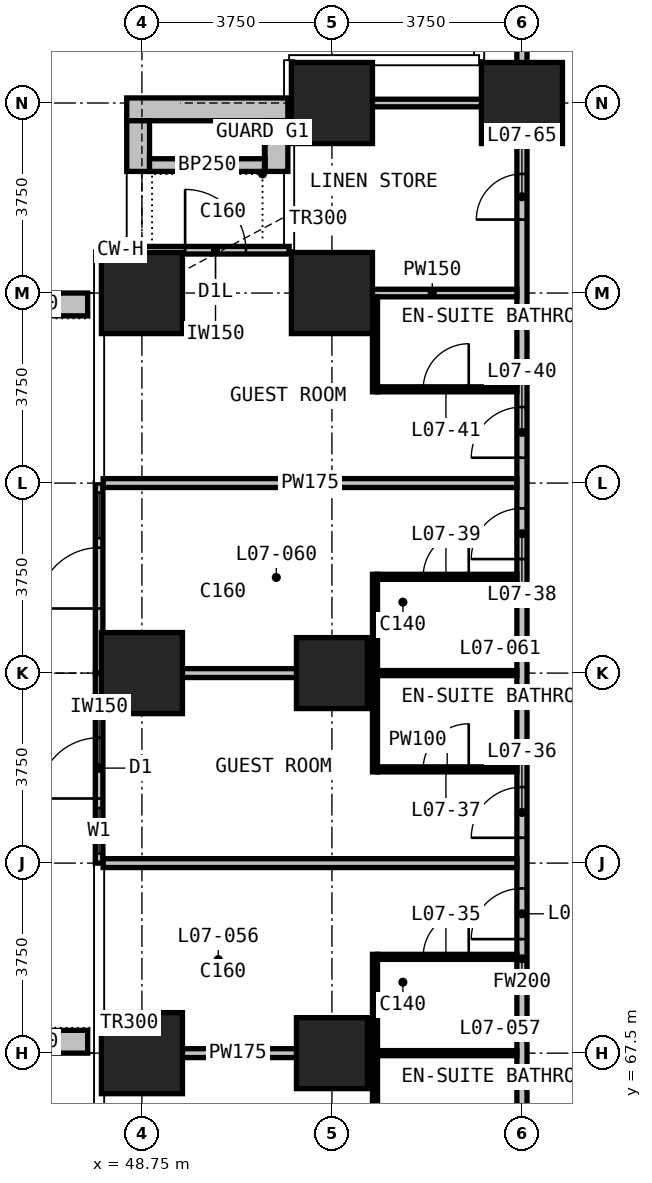
"""IFC4 building model, lengths in metres.
Left out: names, types, materials, properties, quantities, classifications, styles, units other than length and angle.
Written with IfcOpenShell. Run it as: python <this file> out.ifc"""

import sys

from ifc_helpers import new_model, si_unit, direction, frame, frame_2d, origin, origin_2d, place, context, subcontext, project, spatial, rectangle, extrude, element, fill, save


model = new_model("IFC4")
c1 = context("Model", 3, precision=1e-05, world=origin(), true_north=direction((0.0, 1.0)))
c2 = subcontext(c1, "Body", "Model", "MODEL_VIEW")
j1 = project(units=[si_unit("LENGTHUNIT", "METRE"), si_unit("PLANEANGLEUNIT", "RADIAN")], contexts=[c1])
p1 = place(None, origin())
s1 = spatial("IfcSite", under=j1, at=p1, CompositionType="ELEMENT")
p2 = place(p1, origin())
s2 = spatial("IfcBuilding", under=s1, at=p2, CompositionType="ELEMENT")
p3 = place(p2, frame((0.0, 0.0, 42.8)))
s3 = spatial("IfcBuildingStorey", under=s2, at=p3, CompositionType="ELEMENT", Elevation=42.8)
for number, where, z_axis, x_axis in (
    (1, (48.75, 67.5, 0.0), (0.0, 0.0, 1.0), (1.0, 0.0, 0.0)),
    (2, (48.75, 75.0, 0.0), (0.0, 0.0, 1.0), (1.0, 0.0, 0.0)),
    (3, (48.75, 82.5, 0.0), (0.0, 0.0, 1.0), (1.0, 0.0, 0.0)),
):
    element("IfcColumn", number, at=place(p3, frame(where, z_axis=z_axis, x_axis=x_axis)), inside=s3, PredefinedType="COLUMN", context=c2, shape_type="SweptSolid", body=[
        extrude(rectangle(XDim=1.6, YDim=1.6, at=origin_2d()), origin(), (0.0, 0.0, 1.0), 3.3),
    ])
for number, where, z_axis, x_axis in (
    (4, (52.5, 67.5, 0.0), (0.0, 0.0, 1.0), (1.0, 0.0, 0.0)),
    (5, (52.5, 75.0, 0.0), (0.0, 0.0, 1.0), (1.0, 0.0, 0.0)),
):
    element("IfcColumn", number, at=place(p3, frame(where, z_axis=z_axis, x_axis=x_axis)), inside=s3, PredefinedType="COLUMN", context=c2, shape_type="SweptSolid", body=[
        extrude(rectangle(XDim=1.4, YDim=1.4, at=origin_2d()), origin(), (0.0, 0.0, 1.0), 3.3),
    ])
for number, where, z_axis, x_axis in (
    (6, (52.5, 82.5, 0.0), (0.0, 0.0, 1.0), (1.0, 0.0, 0.0)),
    (7, (52.5, 86.25, 0.0), (0.0, 0.0, 1.0), (1.0, 0.0, 0.0)),
    (8, (56.25, 86.25, 0.0), (0.0, 0.0, 1.0), (1.0, 0.0, 0.0)),
):
    element("IfcColumn", number, at=place(p3, frame(where, z_axis=z_axis, x_axis=x_axis)), inside=s3, PredefinedType="COLUMN", context=c2, shape_type="SweptSolid", body=[
        extrude(rectangle(XDim=1.6, YDim=1.6, at=origin_2d()), origin(), (0.0, 0.0, 1.0), 3.3),
    ])
p4 = place(p3, frame((48.75, 83.345, 0.0), z_axis=(0.0, 0.0, 1.0), x_axis=(1.0, 0.0, 0.0)))
e9 = element("IfcWall", 9, at=p4, inside=s3, PredefinedType="SOLIDWALL", context=c2, shape_type="SweptSolid", body=[
    extrude(rectangle(XDim=2.905, YDim=0.15, at=frame_2d((1.453, 0.0))), origin(), (0.0, 0.0, 1.0), 3.0),
])
p5 = place(p4, frame((0.853, 0.0, 0.0)))
e10 = element("IfcOpeningElement", 10, at=p5, cuts=e9, PredefinedType="OPENING", context=c2, shape_type="SweptSolid", body=[
    extrude(rectangle(XDim=1.2, YDim=2.0, at=frame_2d((0.6, 1.0))), frame((0.0, 0.085, 0.0), z_axis=(0.0, -1.0, 0.0), x_axis=(1.0, 0.0, 0.0)), (0.0, 0.0, 1.0), 0.17),
])
p6 = place(p3, frame((47.905, 71.25, 0.0), z_axis=(0.0, 0.0, 1.0), x_axis=(0.0, 1.0, 0.0)))
e11 = element("IfcWall", 11, at=p6, inside=s3, PredefinedType="SOLIDWALL", context=c2, shape_type="SweptSolid", body=[
    extrude(rectangle(XDim=3.75, YDim=0.15, at=frame_2d((1.875, 0.0))), origin(), (0.0, 0.0, 1.0), 3.0),
])
p7 = place(p6, frame((0.188, 0.0, 0.1)))
e12 = element("IfcOpeningElement", 12, at=p7, cuts=e11, PredefinedType="OPENING", context=c2, shape_type="SweptSolid", body=[
    extrude(rectangle(XDim=0.9, YDim=2.4, at=frame_2d((0.45, 1.2))), frame((0.0, 0.085, 0.0), z_axis=(0.0, -1.0, 0.0), x_axis=(1.0, 0.0, 0.0)), (0.0, 0.0, 1.0), 0.17),
])
p8 = place(p6, frame((1.275, 0.0, 0.0)))
e13 = element("IfcOpeningElement", 13, at=p8, cuts=e11, PredefinedType="OPENING", context=c2, shape_type="SweptSolid", body=[
    extrude(rectangle(XDim=1.2, YDim=2.4, at=frame_2d((0.6, 1.2))), frame((0.0, 0.085, 0.0), z_axis=(0.0, -1.0, 0.0), x_axis=(1.0, 0.0, 0.0)), (0.0, 0.0, 1.0), 0.17),
])
p9 = place(p3, frame((47.905, 75.0, 0.0), z_axis=(0.0, 0.0, 1.0), x_axis=(0.0, 1.0, 0.0)))
e14 = element("IfcWall", 14, at=p9, inside=s3, PredefinedType="SOLIDWALL", context=c2, shape_type="SweptSolid", body=[
    extrude(rectangle(XDim=3.75, YDim=0.15, at=frame_2d((1.875, 0.0))), origin(), (0.0, 0.0, 1.0), 3.0),
])
p10 = place(p9, frame((1.275, 0.0, 0.0)))
e15 = element("IfcOpeningElement", 15, at=p10, cuts=e14, PredefinedType="OPENING", context=c2, shape_type="SweptSolid", body=[
    extrude(rectangle(XDim=1.2, YDim=2.4, at=frame_2d((0.6, 1.2))), frame((0.0, 0.085, 0.0), z_axis=(0.0, -1.0, 0.0), x_axis=(1.0, 0.0, 0.0)), (0.0, 0.0, 1.0), 0.17),
])
p11 = place(p9, frame((2.663, 0.0, 0.1)))
e16 = element("IfcOpeningElement", 16, at=p11, cuts=e14, PredefinedType="OPENING", context=c2, shape_type="SweptSolid", body=[
    extrude(rectangle(XDim=0.9, YDim=2.4, at=frame_2d((0.45, 1.2))), frame((0.0, 0.085, 0.0), z_axis=(0.0, -1.0, 0.0), x_axis=(1.0, 0.0, 0.0)), (0.0, 0.0, 1.0), 0.17),
])
p12 = place(p3, frame((48.45, 86.125, 0.0), z_axis=(0.0, 0.0, 1.0), x_axis=(1.0, 0.0, 0.0)))
e17 = element("IfcWall", 17, at=p12, inside=s3, PredefinedType="USERDEFINED", context=c2, shape_type="SweptSolid", body=[
    extrude(rectangle(XDim=3.18, YDim=0.45, at=frame_2d((1.59, 0.0))), origin(), (0.0, 0.0, 1.0), 1.1),
])
for number, where, z_axis, x_axis in (
    (18, (48.675, 84.9, 0.0), (0.0, 0.0, 1.0), (0.0, 1.0, 0.0)),
    (19, (51.405, 84.9, 0.0), (0.0, 0.0, 1.0), (0.0, 1.0, 0.0)),
):
    element("IfcWall", number, at=place(p3, frame(where, z_axis=z_axis, x_axis=x_axis)), inside=s3, PredefinedType="USERDEFINED", context=c2, shape_type="SweptSolid", body=[
        extrude(rectangle(XDim=1.0, YDim=0.45, at=frame_2d((0.5, 0.0))), origin(), (0.0, 0.0, 1.0), 1.1),
    ])
p13 = place(p3, frame((48.9, 85.025, 0.0), z_axis=(0.0, 0.0, 1.0), x_axis=(1.0, 0.0, 0.0)))
e20 = element("IfcWall", 20, at=p13, inside=s3, PredefinedType="USERDEFINED", context=c2, shape_type="SweptSolid", body=[
    extrude(rectangle(XDim=2.28, YDim=0.25, at=frame_2d((1.14, 0.0))), origin(), (0.0, 0.0, 1.0), 1.0),
])
for number, where, z_axis, x_axis in (
    (21, (47.68, 67.725, 0.0), (0.0, 0.0, 1.0), (-1.0, 0.0, 0.0)),
    (22, (47.68, 82.275, 0.0), (0.0, 0.0, 1.0), (-1.0, 0.0, 0.0)),
):
    element("IfcWall", number, at=place(p3, frame(where, z_axis=z_axis, x_axis=x_axis)), inside=s3, PredefinedType="USERDEFINED", context=c2, shape_type="SweptSolid", body=[
        extrude(rectangle(XDim=2.33, YDim=0.45, at=frame_2d((1.165, 0.0))), origin(), (0.0, 0.0, 1.0), 1.1),
    ])
p14 = place(p3, frame((56.25, 52.4, 0.0), z_axis=(0.0, 0.0, 1.0), x_axis=(0.0, 1.0, 0.0)))
e23 = element("IfcWall", 23, at=p14, inside=s3, PredefinedType="PARTITIONING", context=c2, shape_type="SweptSolid", body=[
    extrude(rectangle(XDim=33.925, YDim=0.2, at=frame_2d((16.962, 0.0))), origin(), (0.0, 0.0, 1.0), 3.0),
])
p15 = place(p14, frame((2.35, 0.0, 0.0)))
e24 = element("IfcOpeningElement", 24, at=p15, cuts=e23, PredefinedType="OPENING", context=c2, shape_type="SweptSolid", body=[
    extrude(rectangle(XDim=1.0, YDim=2.2, at=frame_2d((0.5, 1.1))), frame((0.0, 0.11, 0.0), z_axis=(0.0, -1.0, 0.0), x_axis=(1.0, 0.0, 0.0)), (0.0, 0.0, 1.0), 0.22),
])
p16 = place(p14, frame((4.35, 0.0, 0.0)))
e25 = element("IfcOpeningElement", 25, at=p16, cuts=e23, PredefinedType="OPENING", context=c2, shape_type="SweptSolid", body=[
    extrude(rectangle(XDim=1.0, YDim=2.2, at=frame_2d((0.5, 1.1))), frame((0.0, 0.11, 0.0), z_axis=(0.0, -1.0, 0.0), x_axis=(1.0, 0.0, 0.0)), (0.0, 0.0, 1.0), 0.22),
])
p17 = place(p14, frame((9.85, 0.0, 0.0)))
e26 = element("IfcOpeningElement", 26, at=p17, cuts=e23, PredefinedType="OPENING", context=c2, shape_type="SweptSolid", body=[
    extrude(rectangle(XDim=1.0, YDim=2.2, at=frame_2d((0.5, 1.1))), frame((0.0, 0.11, 0.0), z_axis=(0.0, -1.0, 0.0), x_axis=(1.0, 0.0, 0.0)), (0.0, 0.0, 1.0), 0.22),
])
p18 = place(p14, frame((11.85, 0.0, 0.0)))
e27 = element("IfcOpeningElement", 27, at=p18, cuts=e23, PredefinedType="OPENING", context=c2, shape_type="SweptSolid", body=[
    extrude(rectangle(XDim=1.0, YDim=2.2, at=frame_2d((0.5, 1.1))), frame((0.0, 0.11, 0.0), z_axis=(0.0, -1.0, 0.0), x_axis=(1.0, 0.0, 0.0)), (0.0, 0.0, 1.0), 0.22),
])
p19 = place(p14, frame((17.35, 0.0, 0.0)))
e28 = element("IfcOpeningElement", 28, at=p19, cuts=e23, PredefinedType="OPENING", context=c2, shape_type="SweptSolid", body=[
    extrude(rectangle(XDim=1.0, YDim=2.2, at=frame_2d((0.5, 1.1))), frame((0.0, 0.11, 0.0), z_axis=(0.0, -1.0, 0.0), x_axis=(1.0, 0.0, 0.0)), (0.0, 0.0, 1.0), 0.22),
])
p20 = place(p14, frame((19.35, 0.0, 0.0)))
e29 = element("IfcOpeningElement", 29, at=p20, cuts=e23, PredefinedType="OPENING", context=c2, shape_type="SweptSolid", body=[
    extrude(rectangle(XDim=1.0, YDim=2.2, at=frame_2d((0.5, 1.1))), frame((0.0, 0.11, 0.0), z_axis=(0.0, -1.0, 0.0), x_axis=(1.0, 0.0, 0.0)), (0.0, 0.0, 1.0), 0.22),
])
p21 = place(p14, frame((24.85, 0.0, 0.0)))
e30 = element("IfcOpeningElement", 30, at=p21, cuts=e23, PredefinedType="OPENING", context=c2, shape_type="SweptSolid", body=[
    extrude(rectangle(XDim=1.0, YDim=2.2, at=frame_2d((0.5, 1.1))), frame((0.0, 0.11, 0.0), z_axis=(0.0, -1.0, 0.0), x_axis=(1.0, 0.0, 0.0)), (0.0, 0.0, 1.0), 0.22),
])
p22 = place(p14, frame((26.85, 0.0, 0.0)))
e31 = element("IfcOpeningElement", 31, at=p22, cuts=e23, PredefinedType="OPENING", context=c2, shape_type="SweptSolid", body=[
    extrude(rectangle(XDim=1.0, YDim=2.2, at=frame_2d((0.5, 1.1))), frame((0.0, 0.11, 0.0), z_axis=(0.0, -1.0, 0.0), x_axis=(1.0, 0.0, 0.0)), (0.0, 0.0, 1.0), 0.22),
])
p23 = place(p14, frame((31.55, 0.0, 0.0)))
e32 = element("IfcOpeningElement", 32, at=p23, cuts=e23, PredefinedType="OPENING", context=c2, shape_type="SweptSolid", body=[
    extrude(rectangle(XDim=0.9, YDim=2.2, at=frame_2d((0.45, 1.1))), frame((0.0, 0.11, 0.0), z_axis=(0.0, -1.0, 0.0), x_axis=(1.0, 0.0, 0.0)), (0.0, 0.0, 1.0), 0.22),
])
p24 = place(p3, frame((56.25, 86.28, 0.0), z_axis=(0.0, 0.0, 1.0), x_axis=(0.0, 1.0, 0.0)))
e33 = element("IfcWall", 33, at=p24, inside=s3, PredefinedType="PARTITIONING", context=c2, shape_type="SweptSolid", body=[
    extrude(rectangle(XDim=4.365, YDim=0.2, at=frame_2d((2.183, 0.0))), origin(), (0.0, 0.0, 1.0), 3.0),
])
p25 = place(p3, frame((47.985, 67.5, 0.0), z_axis=(0.0, 0.0, 1.0), x_axis=(1.0, 0.0, 0.0)))
e34 = element("IfcWall", 34, at=p25, inside=s3, PredefinedType="PARTITIONING", context=c2, shape_type="SweptSolid", body=[
    extrude(rectangle(XDim=5.315, YDim=0.175, at=frame_2d((2.657, 0.0))), origin(), (0.0, 0.0, 1.0), 3.0),
])
p26 = place(p3, frame((47.985, 71.25, 0.0), z_axis=(0.0, 0.0, 1.0), x_axis=(1.0, 0.0, 0.0)))
e35 = element("IfcWall", 35, at=p26, inside=s3, PredefinedType="PARTITIONING", context=c2, shape_type="SweptSolid", body=[
    extrude(rectangle(XDim=8.165, YDim=0.175, at=frame_2d((4.083, 0.0))), origin(), (0.0, 0.0, 1.0), 3.0),
])
p27 = place(p3, frame((47.985, 75.0, 0.0), z_axis=(0.0, 0.0, 1.0), x_axis=(1.0, 0.0, 0.0)))
e36 = element("IfcWall", 36, at=p27, inside=s3, PredefinedType="PARTITIONING", context=c2, shape_type="SweptSolid", body=[
    extrude(rectangle(XDim=5.315, YDim=0.175, at=frame_2d((2.657, 0.0))), origin(), (0.0, 0.0, 1.0), 3.0),
])
p28 = place(p3, frame((47.985, 78.75, 0.0), z_axis=(0.0, 0.0, 1.0), x_axis=(1.0, 0.0, 0.0)))
e37 = element("IfcWall", 37, at=p28, inside=s3, PredefinedType="PARTITIONING", context=c2, shape_type="SweptSolid", body=[
    extrude(rectangle(XDim=8.165, YDim=0.175, at=frame_2d((4.083, 0.0))), origin(), (0.0, 0.0, 1.0), 3.0),
])
p29 = place(p3, frame((52.81, 82.5, 0.0), z_axis=(0.0, 0.0, 1.0), x_axis=(1.0, 0.0, 0.0)))
e38 = element("IfcWall", 38, at=p29, inside=s3, PredefinedType="PARTITIONING", context=c2, shape_type="SweptSolid", body=[
    extrude(rectangle(XDim=3.34, YDim=0.15, at=frame_2d((1.67, 0.0))), origin(), (0.0, 0.0, 1.0), 3.0),
])
p30 = place(p3, frame((51.855, 86.25, 0.0), z_axis=(0.0, 0.0, 1.0), x_axis=(1.0, 0.0, 0.0)))
e39 = element("IfcWall", 39, at=p30, inside=s3, PredefinedType="PARTITIONING", context=c2, shape_type="SweptSolid", body=[
    extrude(rectangle(XDim=4.295, YDim=0.15, at=frame_2d((2.147, 0.0))), origin(), (0.0, 0.0, 1.0), 3.0),
])
p31 = place(p3, frame((52.735, 82.425, 0.0), z_axis=(0.0, 0.0, 1.0), x_axis=(0.0, 1.0, 0.0)))
e40 = element("IfcWall", 40, at=p31, inside=s3, PredefinedType="PARTITIONING", context=c2, shape_type="SweptSolid", body=[
    extrude(rectangle(XDim=0.84, YDim=0.15, at=frame_2d((0.42, 0.0))), origin(), (0.0, 0.0, 1.0), 3.0),
])
p32 = place(p3, frame((53.4, 67.5, 0.0), z_axis=(0.0, 0.0, 1.0), x_axis=(1.0, 0.0, 0.0)))
e41 = element("IfcWall", 41, at=p32, inside=s3, PredefinedType="PARTITIONING", context=c2, shape_type="SweptSolid", body=[
    extrude(rectangle(XDim=2.75, YDim=0.1, at=frame_2d((1.375, 0.0))), origin(), (0.0, 0.0, 1.0), 3.0),
])
p33 = place(p3, frame((53.4, 69.4, 0.0), z_axis=(0.0, 0.0, 1.0), x_axis=(1.0, 0.0, 0.0)))
e42 = element("IfcWall", 42, at=p33, inside=s3, PredefinedType="PARTITIONING", context=c2, shape_type="SweptSolid", body=[
    extrude(rectangle(XDim=2.75, YDim=0.1, at=frame_2d((1.375, 0.0))), origin(), (0.0, 0.0, 1.0), 3.0),
])
p34 = place(p33, frame((0.9, 0.0, 0.0)))
e43 = element("IfcOpeningElement", 43, at=p34, cuts=e42, PredefinedType="OPENING", context=c2, shape_type="SweptSolid", body=[
    extrude(rectangle(XDim=0.9, YDim=2.2, at=frame_2d((0.45, 1.1))), frame((0.0, 0.06, 0.0), z_axis=(0.0, -1.0, 0.0), x_axis=(1.0, 0.0, 0.0)), (0.0, 0.0, 1.0), 0.12),
])
p35 = place(p3, frame((53.4, 73.1, 0.0), z_axis=(0.0, 0.0, 1.0), x_axis=(1.0, 0.0, 0.0)))
e44 = element("IfcWall", 44, at=p35, inside=s3, PredefinedType="PARTITIONING", context=c2, shape_type="SweptSolid", body=[
    extrude(rectangle(XDim=2.75, YDim=0.1, at=frame_2d((1.375, 0.0))), origin(), (0.0, 0.0, 1.0), 3.0),
])
p36 = place(p35, frame((0.9, 0.0, 0.0)))
e45 = element("IfcOpeningElement", 45, at=p36, cuts=e44, PredefinedType="OPENING", context=c2, shape_type="SweptSolid", body=[
    extrude(rectangle(XDim=0.9, YDim=2.2, at=frame_2d((0.45, 1.1))), frame((0.0, 0.06, 0.0), z_axis=(0.0, -1.0, 0.0), x_axis=(1.0, 0.0, 0.0)), (0.0, 0.0, 1.0), 0.12),
])
p37 = place(p3, frame((53.4, 75.0, 0.0), z_axis=(0.0, 0.0, 1.0), x_axis=(1.0, 0.0, 0.0)))
e46 = element("IfcWall", 46, at=p37, inside=s3, PredefinedType="PARTITIONING", context=c2, shape_type="SweptSolid", body=[
    extrude(rectangle(XDim=2.75, YDim=0.1, at=frame_2d((1.375, 0.0))), origin(), (0.0, 0.0, 1.0), 3.0),
])
p38 = place(p3, frame((53.4, 76.9, 0.0), z_axis=(0.0, 0.0, 1.0), x_axis=(1.0, 0.0, 0.0)))
e47 = element("IfcWall", 47, at=p38, inside=s3, PredefinedType="PARTITIONING", context=c2, shape_type="SweptSolid", body=[
    extrude(rectangle(XDim=2.75, YDim=0.1, at=frame_2d((1.375, 0.0))), origin(), (0.0, 0.0, 1.0), 3.0),
])
p39 = place(p38, frame((0.9, 0.0, 0.0)))
e48 = element("IfcOpeningElement", 48, at=p39, cuts=e47, PredefinedType="OPENING", context=c2, shape_type="SweptSolid", body=[
    extrude(rectangle(XDim=0.9, YDim=2.2, at=frame_2d((0.45, 1.1))), frame((0.0, 0.06, 0.0), z_axis=(0.0, -1.0, 0.0), x_axis=(1.0, 0.0, 0.0)), (0.0, 0.0, 1.0), 0.12),
])
p40 = place(p3, frame((53.4, 80.6, 0.0), z_axis=(0.0, 0.0, 1.0), x_axis=(1.0, 0.0, 0.0)))
e49 = element("IfcWall", 49, at=p40, inside=s3, PredefinedType="PARTITIONING", context=c2, shape_type="SweptSolid", body=[
    extrude(rectangle(XDim=2.75, YDim=0.1, at=frame_2d((1.375, 0.0))), origin(), (0.0, 0.0, 1.0), 3.0),
])
p41 = place(p40, frame((0.9, 0.0, 0.0)))
e50 = element("IfcOpeningElement", 50, at=p41, cuts=e49, PredefinedType="OPENING", context=c2, shape_type="SweptSolid", body=[
    extrude(rectangle(XDim=0.9, YDim=2.2, at=frame_2d((0.45, 1.1))), frame((0.0, 0.06, 0.0), z_axis=(0.0, -1.0, 0.0), x_axis=(1.0, 0.0, 0.0)), (0.0, 0.0, 1.0), 0.12),
])
for number, where, z_axis, x_axis in (
    (51, (53.35, 65.55, 0.0), (0.0, 0.0, 1.0), (0.0, 1.0, 0.0)),
    (52, (53.35, 73.05, 0.0), (0.0, 0.0, 1.0), (0.0, 1.0, 0.0)),
):
    element("IfcWall", number, at=place(p3, frame(where, z_axis=z_axis, x_axis=x_axis)), inside=s3, PredefinedType="PARTITIONING", context=c2, shape_type="SweptSolid", body=[
        extrude(rectangle(XDim=3.9, YDim=0.1, at=frame_2d((1.95, 0.0))), origin(), (0.0, 0.0, 1.0), 3.0),
    ])
p42 = place(p3, frame((53.35, 80.55, 0.0), z_axis=(0.0, 0.0, 1.0), x_axis=(0.0, 1.0, 0.0)))
e53 = element("IfcWall", 53, at=p42, inside=s3, PredefinedType="PARTITIONING", context=c2, shape_type="SweptSolid", body=[
    extrude(rectangle(XDim=1.875, YDim=0.1, at=frame_2d((0.938, 0.0))), origin(), (0.0, 0.0, 1.0), 3.0),
])
p43 = place(p5, origin())
e54 = element("IfcDoor", 54, at=p43, inside=s3, OperationType="SINGLE_SWING_LEFT", PredefinedType="DOOR", context=c2, shape_type="SweptSolid", body=[
    extrude(rectangle(XDim=1.2, YDim=2.0, at=frame_2d((0.6, 1.0))), frame((0.0, 0.025, 0.0), z_axis=(0.0, -1.0, 0.0), x_axis=(1.0, 0.0, 0.0)), (0.0, 0.0, 1.0), 0.05),
])
fill(e10, e54)
p44 = place(p7, origin())
e55 = element("IfcWindow", 55, at=p44, inside=s3, PartitioningType="SINGLE_PANEL", PredefinedType="WINDOW", context=c2, shape_type="SweptSolid", body=[
    extrude(rectangle(XDim=0.9, YDim=2.4, at=frame_2d((0.45, 1.2))), frame((0.0, 0.03, 0.0), z_axis=(0.0, -1.0, 0.0), x_axis=(1.0, 0.0, 0.0)), (0.0, 0.0, 1.0), 0.06),
])
fill(e12, e55)
p45 = place(p8, origin())
e56 = element("IfcDoor", 56, at=p45, inside=s3, OperationType="SINGLE_SWING_LEFT", PredefinedType="DOOR", context=c2, shape_type="SweptSolid", body=[
    extrude(rectangle(XDim=1.2, YDim=2.4, at=frame_2d((0.6, 1.2))), frame((0.0, 0.025, 0.0), z_axis=(0.0, -1.0, 0.0), x_axis=(1.0, 0.0, 0.0)), (0.0, 0.0, 1.0), 0.05),
])
fill(e13, e56)
p46 = place(p10, origin())
e57 = element("IfcDoor", 57, at=p46, inside=s3, OperationType="SINGLE_SWING_LEFT", PredefinedType="DOOR", context=c2, shape_type="SweptSolid", body=[
    extrude(rectangle(XDim=1.2, YDim=2.4, at=frame_2d((0.6, 1.2))), frame((0.0, 0.025, 0.0), z_axis=(0.0, -1.0, 0.0), x_axis=(1.0, 0.0, 0.0)), (0.0, 0.0, 1.0), 0.05),
])
fill(e15, e57)
p47 = place(p11, origin())
e58 = element("IfcWindow", 58, at=p47, inside=s3, PartitioningType="SINGLE_PANEL", PredefinedType="WINDOW", context=c2, shape_type="SweptSolid", body=[
    extrude(rectangle(XDim=0.9, YDim=2.4, at=frame_2d((0.45, 1.2))), frame((0.0, 0.03, 0.0), z_axis=(0.0, -1.0, 0.0), x_axis=(1.0, 0.0, 0.0)), (0.0, 0.0, 1.0), 0.06),
])
fill(e16, e58)
p48 = place(p19, origin())
e59 = element("IfcDoor", 59, at=p48, inside=s3, OperationType="SINGLE_SWING_LEFT", PredefinedType="DOOR", context=c2, shape_type="SweptSolid", body=[
    extrude(rectangle(XDim=1.0, YDim=2.2, at=frame_2d((0.5, 1.1))), frame((0.0, 0.025, 0.0), z_axis=(0.0, -1.0, 0.0), x_axis=(1.0, 0.0, 0.0)), (0.0, 0.0, 1.0), 0.05),
])
fill(e28, e59)
p49 = place(p34, origin())
e60 = element("IfcDoor", 60, at=p49, inside=s3, OperationType="SINGLE_SWING_RIGHT", PredefinedType="DOOR", context=c2, shape_type="SweptSolid", body=[
    extrude(rectangle(XDim=0.9, YDim=2.2, at=frame_2d((0.45, 1.1))), frame((0.0, 0.025, 0.0), z_axis=(0.0, -1.0, 0.0), x_axis=(1.0, 0.0, 0.0)), (0.0, 0.0, 1.0), 0.05),
])
fill(e43, e60)
p50 = place(p20, origin())
e61 = element("IfcDoor", 61, at=p50, inside=s3, OperationType="SINGLE_SWING_RIGHT", PredefinedType="DOOR", context=c2, shape_type="SweptSolid", body=[
    extrude(rectangle(XDim=1.0, YDim=2.2, at=frame_2d((0.5, 1.1))), frame((0.0, 0.025, 0.0), z_axis=(0.0, -1.0, 0.0), x_axis=(1.0, 0.0, 0.0)), (0.0, 0.0, 1.0), 0.05),
])
fill(e29, e61)
p51 = place(p36, origin())
e62 = element("IfcDoor", 62, at=p51, inside=s3, OperationType="SINGLE_SWING_RIGHT", PredefinedType="DOOR", context=c2, shape_type="SweptSolid", body=[
    extrude(rectangle(XDim=0.9, YDim=2.2, at=frame_2d((0.45, 1.1))), frame((0.0, 0.025, 0.0), z_axis=(0.0, -1.0, 0.0), x_axis=(1.0, 0.0, 0.0)), (0.0, 0.0, 1.0), 0.05),
])
fill(e45, e62)
p52 = place(p21, origin())
e63 = element("IfcDoor", 63, at=p52, inside=s3, OperationType="SINGLE_SWING_LEFT", PredefinedType="DOOR", context=c2, shape_type="SweptSolid", body=[
    extrude(rectangle(XDim=1.0, YDim=2.2, at=frame_2d((0.5, 1.1))), frame((0.0, 0.025, 0.0), z_axis=(0.0, -1.0, 0.0), x_axis=(1.0, 0.0, 0.0)), (0.0, 0.0, 1.0), 0.05),
])
fill(e30, e63)
p53 = place(p39, origin())
e64 = element("IfcDoor", 64, at=p53, inside=s3, OperationType="SINGLE_SWING_RIGHT", PredefinedType="DOOR", context=c2, shape_type="SweptSolid", body=[
    extrude(rectangle(XDim=0.9, YDim=2.2, at=frame_2d((0.45, 1.1))), frame((0.0, 0.025, 0.0), z_axis=(0.0, -1.0, 0.0), x_axis=(1.0, 0.0, 0.0)), (0.0, 0.0, 1.0), 0.05),
])
fill(e48, e64)
p54 = place(p22, origin())
e65 = element("IfcDoor", 65, at=p54, inside=s3, OperationType="SINGLE_SWING_LEFT", PredefinedType="DOOR", context=c2, shape_type="SweptSolid", body=[
    extrude(rectangle(XDim=1.0, YDim=2.2, at=frame_2d((0.5, 1.1))), frame((0.0, 0.025, 0.0), z_axis=(0.0, -1.0, 0.0), x_axis=(1.0, 0.0, 0.0)), (0.0, 0.0, 1.0), 0.05),
])
fill(e31, e65)
p55 = place(p41, origin())
e66 = element("IfcDoor", 66, at=p55, inside=s3, OperationType="SINGLE_SWING_RIGHT", PredefinedType="DOOR", context=c2, shape_type="SweptSolid", body=[
    extrude(rectangle(XDim=0.9, YDim=2.2, at=frame_2d((0.45, 1.1))), frame((0.0, 0.025, 0.0), z_axis=(0.0, -1.0, 0.0), x_axis=(1.0, 0.0, 0.0)), (0.0, 0.0, 1.0), 0.05),
])
fill(e50, e66)
p56 = place(p23, origin())
e67 = element("IfcDoor", 67, at=p56, inside=s3, OperationType="SINGLE_SWING_LEFT", PredefinedType="DOOR", context=c2, shape_type="SweptSolid", body=[
    extrude(rectangle(XDim=0.9, YDim=2.2, at=frame_2d((0.45, 1.1))), frame((0.0, 0.025, 0.0), z_axis=(0.0, -1.0, 0.0), x_axis=(1.0, 0.0, 0.0)), (0.0, 0.0, 1.0), 0.05),
])
fill(e32, e67)
save(model, sys.argv[1])
